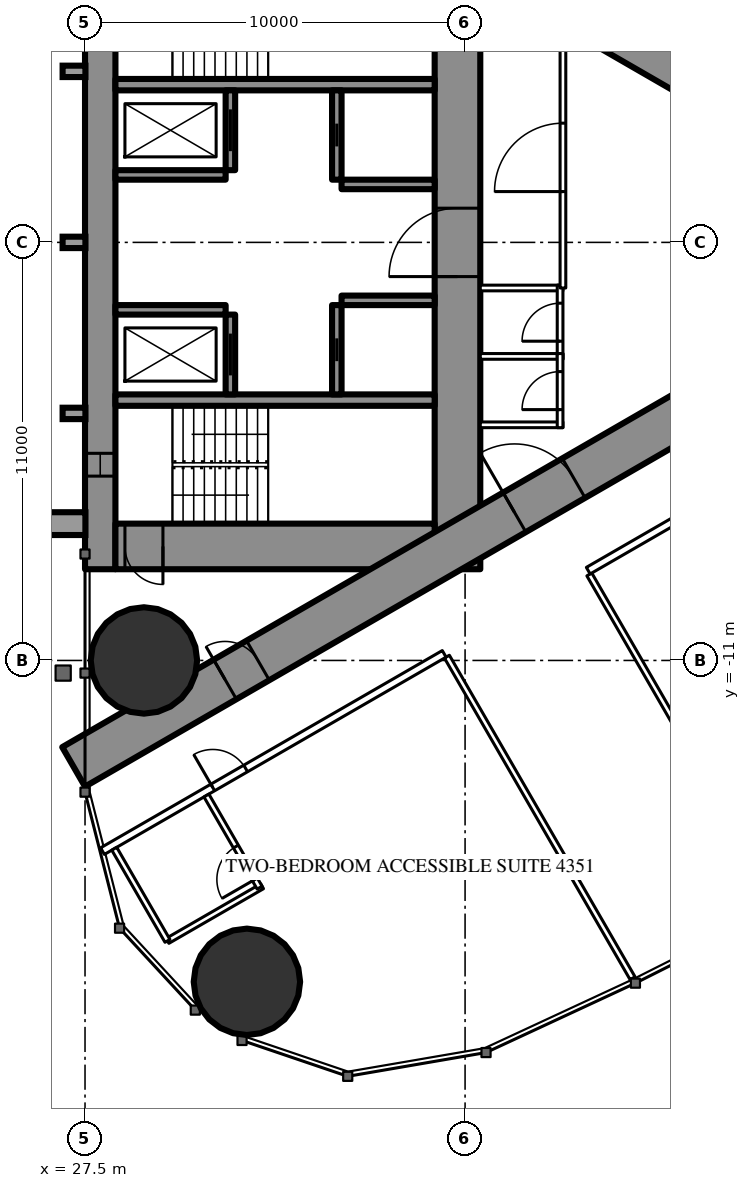
"""IFC4 building model, lengths in metres.
Left out: names, types, materials, properties, quantities, classifications, styles, units other than length and angle.
Written with IfcOpenShell. Run it as: python <this file> out.ifc"""

import sys

from ifc_helpers import new_model, si_unit, direction, frame, frame_2d, origin, origin_2d, place, context, subcontext, project, spatial, rectangle, circle, extrude, element, fill, save


model = new_model("IFC4")
c1 = context("Model", 3, precision=1e-05, world=origin(), true_north=direction((0.0, 1.0)))
c2 = subcontext(c1, "Body", "Model", "MODEL_VIEW")
j1 = project(units=[si_unit("LENGTHUNIT", "METRE"), si_unit("PLANEANGLEUNIT", "RADIAN")], contexts=[c1])
p1 = place(None, origin())
s1 = spatial("IfcSite", under=j1, at=p1, CompositionType="ELEMENT")
p2 = place(p1, origin())
s2 = spatial("IfcBuilding", under=s1, at=p2, CompositionType="ELEMENT")
p3 = place(p2, frame((0.0, 0.0, 163.3)))
s3 = spatial("IfcBuildingStorey", under=s2, at=p3, CompositionType="ELEMENT", Elevation=163.3)
for number, where, z_axis, x_axis in (
    (1, (31.76, -19.456, 0.0), (0.0, 0.0, 1.0), (1.0, 0.0, 0.0)),
    (2, (29.05, -11.0, 0.0), (0.0, 0.0, 1.0), (1.0, 0.0, 0.0)),
):
    element("IfcColumn", number, at=place(p3, frame(where, z_axis=z_axis, x_axis=x_axis)), inside=s3, PredefinedType="COLUMN", context=c2, shape_type="SweptSolid", body=[
        extrude(circle(Radius=1.4, at=origin_2d()), origin(), (0.0, 0.0, 1.0), 3.5),
    ])
p4 = place(p3, frame((27.9, -8.6, 0.0), z_axis=(0.0, 0.0, 1.0), x_axis=(0.0, 1.0, 0.0)))
e3 = element("IfcWall", 3, at=p4, inside=s3, PredefinedType="SHEAR", context=c2, shape_type="SweptSolid", body=[
    extrude(rectangle(XDim=17.2, YDim=0.8, at=frame_2d((8.6, 0.0))), origin(), (0.0, 0.0, 1.0), 3.5),
])
p5 = place(p4, frame((2.45, 0.0, 0.6)))
e4 = element("IfcOpeningElement", 4, at=p5, cuts=e3, PredefinedType="OPENING", context=c2, shape_type="SweptSolid", body=[
    extrude(rectangle(XDim=0.6, YDim=2.1, at=frame_2d((0.3, 1.05))), frame((0.0, 0.41, 0.0), z_axis=(0.0, -1.0, 0.0), x_axis=(1.0, 0.0, 0.0)), (0.0, 0.0, 1.0), 0.82),
])
p6 = place(p4, frame((14.15, 0.0, 0.6)))
e5 = element("IfcOpeningElement", 5, at=p6, cuts=e3, PredefinedType="OPENING", context=c2, shape_type="SweptSolid", body=[
    extrude(rectangle(XDim=0.6, YDim=2.1, at=frame_2d((0.3, 1.05))), frame((0.0, 0.41, 0.0), z_axis=(0.0, -1.0, 0.0), x_axis=(1.0, 0.0, 0.0)), (0.0, 0.0, 1.0), 0.82),
])
p7 = place(p3, frame((37.3, -8.6, 0.0), z_axis=(0.0, 0.0, 1.0), x_axis=(0.0, 1.0, 0.0)))
e6 = element("IfcWall", 6, at=p7, inside=s3, PredefinedType="SHEAR", context=c2, shape_type="SweptSolid", body=[
    extrude(rectangle(XDim=17.2, YDim=1.2, at=frame_2d((8.6, 0.0))), origin(), (0.0, 0.0, 1.0), 3.5),
])
p8 = place(p7, frame((7.7, 0.0, 0.0)))
e7 = element("IfcOpeningElement", 7, at=p8, cuts=e6, PredefinedType="OPENING", context=c2, shape_type="SweptSolid", body=[
    extrude(rectangle(XDim=1.8, YDim=2.2, at=frame_2d((0.9, 1.1))), frame((0.0, 0.61, 0.0), z_axis=(0.0, -1.0, 0.0), x_axis=(1.0, 0.0, 0.0)), (0.0, 0.0, 1.0), 1.22),
])
p9 = place(p3, frame((28.3, -8.0, 0.0), z_axis=(0.0, 0.0, 1.0), x_axis=(1.0, 0.0, 0.0)))
e8 = element("IfcWall", 8, at=p9, inside=s3, PredefinedType="SHEAR", context=c2, shape_type="SweptSolid", body=[
    extrude(rectangle(XDim=8.4, YDim=1.2, at=frame_2d((4.2, 0.0))), origin(), (0.0, 0.0, 1.0), 3.5),
])
p10 = place(p9, frame((0.25, 0.0, 0.0)))
e9 = element("IfcOpeningElement", 9, at=p10, cuts=e8, PredefinedType="OPENING", context=c2, shape_type="SweptSolid", body=[
    extrude(rectangle(XDim=1.0, YDim=2.2, at=frame_2d((0.5, 1.1))), frame((0.0, 0.61, 0.0), z_axis=(0.0, -1.0, 0.0), x_axis=(1.0, 0.0, 0.0)), (0.0, 0.0, 1.0), 1.22),
])
for number, where, z_axis, x_axis in (
    (10, (28.3, -4.15, 0.0), (0.0, 0.0, 1.0), (1.0, 0.0, 0.0)),
    (11, (28.3, 4.15, 0.0), (0.0, 0.0, 1.0), (1.0, 0.0, 0.0)),
):
    element("IfcWall", number, at=place(p3, frame(where, z_axis=z_axis, x_axis=x_axis)), inside=s3, PredefinedType="SHEAR", context=c2, shape_type="SweptSolid", body=[
        extrude(rectangle(XDim=8.4, YDim=0.3, at=frame_2d((4.2, 0.0))), origin(), (0.0, 0.0, 1.0), 3.5),
    ])
p11 = place(p3, frame((31.325, -4.0, 0.0), z_axis=(0.0, 0.0, 1.0), x_axis=(0.0, 1.0, 0.0)))
e12 = element("IfcWall", 12, at=p11, inside=s3, PredefinedType="SHEAR", context=c2, shape_type="SweptSolid", body=[
    extrude(rectangle(XDim=2.1, YDim=0.25, at=frame_2d((1.05, 0.0))), origin(), (0.0, 0.0, 1.0), 3.5),
])
p12 = place(p11, frame((0.5, 0.0, 0.0)))
e13 = element("IfcOpeningElement", 13, at=p12, cuts=e12, PredefinedType="OPENING", context=c2, shape_type="SweptSolid", body=[
    extrude(rectangle(XDim=1.1, YDim=2.2, at=frame_2d((0.55, 1.1))), frame((0.0, 0.135, 0.0), z_axis=(0.0, -1.0, 0.0), x_axis=(1.0, 0.0, 0.0)), (0.0, 0.0, 1.0), 0.27),
])
p13 = place(p3, frame((34.125, -4.0, 0.0), z_axis=(0.0, 0.0, 1.0), x_axis=(0.0, 1.0, 0.0)))
e14 = element("IfcWall", 14, at=p13, inside=s3, PredefinedType="SHEAR", context=c2, shape_type="SweptSolid", body=[
    extrude(rectangle(XDim=2.35, YDim=0.25, at=frame_2d((1.175, 0.0))), origin(), (0.0, 0.0, 1.0), 3.5),
])
p14 = place(p13, frame((0.875, 0.0, 0.0)))
e15 = element("IfcOpeningElement", 15, at=p14, cuts=e14, PredefinedType="OPENING", context=c2, shape_type="SweptSolid", body=[
    extrude(rectangle(XDim=0.6, YDim=2.0, at=frame_2d((0.3, 1.0))), frame((0.0, 0.135, 0.0), z_axis=(0.0, -1.0, 0.0), x_axis=(1.0, 0.0, 0.0)), (0.0, 0.0, 1.0), 0.27),
])
p15 = place(p3, frame((28.3, -1.775, 0.0), z_axis=(0.0, 0.0, 1.0), x_axis=(1.0, 0.0, 0.0)))
e16 = element("IfcWall", 16, at=p15, inside=s3, PredefinedType="SHEAR", context=c2, shape_type="SweptSolid", body=[
    extrude(rectangle(XDim=2.9, YDim=0.25, at=frame_2d((1.45, 0.0))), origin(), (0.0, 0.0, 1.0), 3.5),
])
p16 = place(p3, frame((34.25, -1.525, 0.0), z_axis=(0.0, 0.0, 1.0), x_axis=(1.0, 0.0, 0.0)))
e17 = element("IfcWall", 17, at=p16, inside=s3, PredefinedType="SHEAR", context=c2, shape_type="SweptSolid", body=[
    extrude(rectangle(XDim=2.45, YDim=0.25, at=frame_2d((1.225, 0.0))), origin(), (0.0, 0.0, 1.0), 3.5),
])
p17 = place(p3, frame((31.325, 1.9, 0.0), z_axis=(0.0, 0.0, 1.0), x_axis=(0.0, 1.0, 0.0)))
e18 = element("IfcWall", 18, at=p17, inside=s3, PredefinedType="SHEAR", context=c2, shape_type="SweptSolid", body=[
    extrude(rectangle(XDim=2.1, YDim=0.25, at=frame_2d((1.05, 0.0))), origin(), (0.0, 0.0, 1.0), 3.5),
])
p18 = place(p17, frame((0.5, 0.0, 0.0)))
e19 = element("IfcOpeningElement", 19, at=p18, cuts=e18, PredefinedType="OPENING", context=c2, shape_type="SweptSolid", body=[
    extrude(rectangle(XDim=1.1, YDim=2.2, at=frame_2d((0.55, 1.1))), frame((0.0, 0.135, 0.0), z_axis=(0.0, -1.0, 0.0), x_axis=(1.0, 0.0, 0.0)), (0.0, 0.0, 1.0), 0.27),
])
p19 = place(p3, frame((34.125, 1.65, 0.0), z_axis=(0.0, 0.0, 1.0), x_axis=(0.0, 1.0, 0.0)))
e20 = element("IfcWall", 20, at=p19, inside=s3, PredefinedType="SHEAR", context=c2, shape_type="SweptSolid", body=[
    extrude(rectangle(XDim=2.35, YDim=0.25, at=frame_2d((1.175, 0.0))), origin(), (0.0, 0.0, 1.0), 3.5),
])
p20 = place(p19, frame((0.875, 0.0, 0.0)))
e21 = element("IfcOpeningElement", 21, at=p20, cuts=e20, PredefinedType="OPENING", context=c2, shape_type="SweptSolid", body=[
    extrude(rectangle(XDim=0.6, YDim=2.0, at=frame_2d((0.3, 1.0))), frame((0.0, 0.135, 0.0), z_axis=(0.0, -1.0, 0.0), x_axis=(1.0, 0.0, 0.0)), (0.0, 0.0, 1.0), 0.27),
])
p21 = place(p3, frame((28.3, 1.775, 0.0), z_axis=(0.0, 0.0, 1.0), x_axis=(1.0, 0.0, 0.0)))
e22 = element("IfcWall", 22, at=p21, inside=s3, PredefinedType="SHEAR", context=c2, shape_type="SweptSolid", body=[
    extrude(rectangle(XDim=2.9, YDim=0.25, at=frame_2d((1.45, 0.0))), origin(), (0.0, 0.0, 1.0), 3.5),
])
p22 = place(p3, frame((34.25, 1.525, 0.0), z_axis=(0.0, 0.0, 1.0), x_axis=(1.0, 0.0, 0.0)))
e23 = element("IfcWall", 23, at=p22, inside=s3, PredefinedType="SHEAR", context=c2, shape_type="SweptSolid", body=[
    extrude(rectangle(XDim=2.45, YDim=0.25, at=frame_2d((1.225, 0.0))), origin(), (0.0, 0.0, 1.0), 3.5),
])
p23 = place(p3, frame((27.2, -13.8, 0.0), z_axis=(0.0, 0.0, 1.0), x_axis=(0.866027159892, 0.499996958321, 0.0)))
e24 = element("IfcWall", 24, at=p23, inside=s3, PredefinedType="SHEAR", context=c2, shape_type="SweptSolid", body=[
    extrude(rectangle(XDim=27.947, YDim=1.2, at=frame_2d((13.973, 0.0))), origin(), (0.0, 0.0, 1.0), 3.5),
])
p24 = place(p23, frame((4.6, 0.0, 0.0)))
e25 = element("IfcOpeningElement", 25, at=p24, cuts=e24, PredefinedType="OPENING", context=c2, shape_type="SweptSolid", body=[
    extrude(rectangle(XDim=1.0, YDim=2.2, at=frame_2d((0.5, 1.1))), frame((0.0, 0.61, 0.0), z_axis=(0.0, -1.0, 0.0), x_axis=(1.0, 0.0, 0.0)), (0.0, 0.0, 1.0), 1.22),
])
p25 = place(p23, frame((13.395, 0.0, 0.0)))
e26 = element("IfcOpeningElement", 26, at=p25, cuts=e24, PredefinedType="OPENING", context=c2, shape_type="SweptSolid", body=[
    extrude(rectangle(XDim=1.8, YDim=2.2, at=frame_2d((0.9, 1.1))), frame((0.0, 0.61, 0.0), z_axis=(0.0, -1.0, 0.0), x_axis=(1.0, 0.0, 0.0)), (0.0, 0.0, 1.0), 1.22),
])
p26 = place(p3, frame((27.2, 13.8, 0.0), z_axis=(0.0, 0.0, 1.0), x_axis=(0.866024515034, -0.500001539357, 0.0)))
e27 = element("IfcWall", 27, at=p26, inside=s3, PredefinedType="SHEAR", context=c2, shape_type="SweptSolid", body=[
    extrude(rectangle(XDim=26.907, YDim=1.2, at=frame_2d((13.454, 0.0))), origin(), (0.0, 0.0, 1.0), 3.5),
])
p27 = place(p26, frame((4.6, 0.0, 0.0)))
e28 = element("IfcOpeningElement", 28, at=p27, cuts=e27, PredefinedType="OPENING", context=c2, shape_type="SweptSolid", body=[
    extrude(rectangle(XDim=1.0, YDim=2.2, at=frame_2d((0.5, 1.1))), frame((0.0, 0.61, 0.0), z_axis=(0.0, -1.0, 0.0), x_axis=(1.0, 0.0, 0.0)), (0.0, 0.0, 1.0), 1.22),
])
p28 = place(p26, frame((13.395, 0.0, 0.0)))
e29 = element("IfcOpeningElement", 29, at=p28, cuts=e27, PredefinedType="OPENING", context=c2, shape_type="SweptSolid", body=[
    extrude(rectangle(XDim=1.8, YDim=2.2, at=frame_2d((0.9, 1.1))), frame((0.0, 0.61, 0.0), z_axis=(0.0, -1.0, 0.0), x_axis=(1.0, 0.0, 0.0)), (0.0, 0.0, 1.0), 1.22),
])
p29 = place(p3, frame((37.022, -10.9, 0.0), z_axis=(0.0, 0.0, 1.0), x_axis=(0.499998620953, -0.866026199976, 0.0)))
e30 = element("IfcWall", 30, at=p29, inside=s3, PredefinedType="PARTITIONING", context=c2, shape_type="SweptSolid", body=[
    extrude(rectangle(XDim=9.77, YDim=0.15, at=frame_2d((4.885, 0.0))), origin(), (0.0, 0.0, 1.0), 3.25),
])
p30 = place(p3, frame((40.769, -8.737, 0.0), z_axis=(0.0, 0.0, 1.0), x_axis=(0.500013115284, -0.866017831539, 0.0)))
e31 = element("IfcWall", 31, at=p30, inside=s3, PredefinedType="PARTITIONING", context=c2, shape_type="SweptSolid", body=[
    extrude(rectangle(XDim=7.198, YDim=0.15, at=frame_2d((3.599, 0.0))), origin(), (0.0, 0.0, 1.0), 2.3),
])
p31 = place(p3, frame((27.959, -16.017, 0.0), z_axis=(0.0, 0.0, 1.0), x_axis=(0.866026201739, 0.499998617899, 0.0)))
e32 = element("IfcWall", 32, at=p31, inside=s3, PredefinedType="PARTITIONING", context=c2, shape_type="SweptSolid", body=[
    extrude(rectangle(XDim=10.382, YDim=0.2, at=frame_2d((5.191, 0.0))), origin(), (0.0, 0.0, 1.0), 3.25),
])
p32 = place(p31, frame((3.35, 0.0, 0.0)))
e33 = element("IfcOpeningElement", 33, at=p32, cuts=e32, PredefinedType="OPENING", context=c2, shape_type="SweptSolid", body=[
    extrude(rectangle(XDim=1.0, YDim=2.2, at=frame_2d((0.5, 1.1))), frame((0.0, 0.11, 0.0), z_axis=(0.0, -1.0, 0.0), x_axis=(1.0, 0.0, 0.0)), (0.0, 0.0, 1.0), 0.22),
])
p33 = place(p3, frame((40.741, -8.638, 0.0), z_axis=(0.0, 0.0, 1.0), x_axis=(0.866022967338, 0.500004220025, 0.0)))
e34 = element("IfcWall", 34, at=p33, inside=s3, PredefinedType="PARTITIONING", context=c2, shape_type="SweptSolid", body=[
    extrude(rectangle(XDim=17.276, YDim=0.2, at=frame_2d((8.638, 0.0))), origin(), (0.0, 0.0, 1.0), 3.25),
])
p34 = place(p33, frame((7.316, 0.0, 0.0)))
e35 = element("IfcOpeningElement", 35, at=p34, cuts=e34, PredefinedType="OPENING", context=c2, shape_type="SweptSolid", body=[
    extrude(rectangle(XDim=0.95, YDim=2.2, at=frame_2d((0.475, 1.1))), frame((0.0, 0.11, 0.0), z_axis=(0.0, -1.0, 0.0), x_axis=(1.0, 0.0, 0.0)), (0.0, 0.0, 1.0), 0.22),
])
p35 = place(p33, frame((11.366, 0.0, 0.0)))
e36 = element("IfcOpeningElement", 36, at=p35, cuts=e34, PredefinedType="OPENING", context=c2, shape_type="SweptSolid", body=[
    extrude(rectangle(XDim=0.95, YDim=2.2, at=frame_2d((0.475, 1.1))), frame((0.0, 0.11, 0.0), z_axis=(0.0, -1.0, 0.0), x_axis=(1.0, 0.0, 0.0)), (0.0, 0.0, 1.0), 0.22),
])
p36 = place(p33, frame((13.347, 0.0, 0.0)))
e37 = element("IfcOpeningElement", 37, at=p36, cuts=e34, PredefinedType="OPENING", context=c2, shape_type="SweptSolid", body=[
    extrude(rectangle(XDim=0.95, YDim=2.2, at=frame_2d((0.475, 1.1))), frame((0.0, 0.11, 0.0), z_axis=(0.0, -1.0, 0.0), x_axis=(1.0, 0.0, 0.0)), (0.0, 0.0, 1.0), 0.22),
])
p37 = place(p3, frame((29.669, -18.379, 0.0), z_axis=(0.0, 0.0, 1.0), x_axis=(0.866039941686, 0.499974818771, 0.0)))
e38 = element("IfcWall", 38, at=p37, inside=s3, PredefinedType="PARTITIONING", context=c2, shape_type="SweptSolid", body=[
    extrude(rectangle(XDim=2.875, YDim=0.15, at=frame_2d((1.438, 0.0))), origin(), (0.0, 0.0, 1.0), 3.25),
])
p38 = place(p3, frame((30.694, -14.554, 0.0), z_axis=(0.0, 0.0, 1.0), x_axis=(0.500049511043, -0.865996816683, 0.0)))
e39 = element("IfcWall", 39, at=p38, inside=s3, PredefinedType="PARTITIONING", context=c2, shape_type="SweptSolid", body=[
    extrude(rectangle(XDim=2.8, YDim=0.15, at=frame_2d((1.4, 0.0))), origin(), (0.0, 0.0, 1.0), 2.3),
])
p39 = place(p38, frame((1.55, 0.0, 0.0)))
e40 = element("IfcOpeningElement", 40, at=p39, cuts=e39, PredefinedType="OPENING", context=c2, shape_type="SweptSolid", body=[
    extrude(rectangle(XDim=1.0, YDim=2.2, at=frame_2d((0.5, 1.1))), frame((0.0, 0.085, 0.0), z_axis=(0.0, -1.0, 0.0), x_axis=(1.0, 0.0, 0.0)), (0.0, 0.0, 1.0), 0.17),
])
p40 = place(p3, frame((28.269, -15.954, 0.0), z_axis=(0.0, 0.0, 1.0), x_axis=(0.49998411664, -0.866034573852, 0.0)))
e41 = element("IfcWall", 41, at=p40, inside=s3, PredefinedType="PARTITIONING", context=c2, shape_type="SweptSolid", body=[
    extrude(rectangle(XDim=2.8, YDim=0.15, at=frame_2d((1.4, 0.0))), origin(), (0.0, 0.0, 1.0), 3.25),
])
for number, where, z_axis, x_axis in (
    (42, (37.9, -1.2, 0.0), (0.0, 0.0, 1.0), (1.0, 0.0, 0.0)),
    (43, (37.9, -3.0, 0.0), (0.0, 0.0, 1.0), (1.0, 0.0, 0.0)),
    (44, (37.9, -4.8, 0.0), (0.0, 0.0, 1.0), (1.0, 0.0, 0.0)),
):
    element("IfcWall", number, at=place(p3, frame(where, z_axis=z_axis, x_axis=x_axis)), inside=s3, PredefinedType="PARTITIONING", context=c2, shape_type="SweptSolid", body=[
        extrude(rectangle(XDim=2.175, YDim=0.15, at=frame_2d((1.087, 0.0))), origin(), (0.0, 0.0, 1.0), 3.25),
    ])
p41 = place(p3, frame((40.0, -3.075, 0.0), z_axis=(0.0, 0.0, 1.0), x_axis=(0.0, 1.0, 0.0)))
e45 = element("IfcWall", 45, at=p41, inside=s3, PredefinedType="PARTITIONING", context=c2, shape_type="SweptSolid", body=[
    extrude(rectangle(XDim=1.95, YDim=0.15, at=frame_2d((0.975, 0.0))), origin(), (0.0, 0.0, 1.0), 3.25),
])
p42 = place(p41, frame((0.475, 0.0, 0.0)))
e46 = element("IfcOpeningElement", 46, at=p42, cuts=e45, PredefinedType="OPENING", context=c2, shape_type="SweptSolid", body=[
    extrude(rectangle(XDim=1.0, YDim=2.2, at=frame_2d((0.5, 1.1))), frame((0.0, 0.085, 0.0), z_axis=(0.0, -1.0, 0.0), x_axis=(1.0, 0.0, 0.0)), (0.0, 0.0, 1.0), 0.17),
])
p43 = place(p3, frame((40.0, -4.875, 0.0), z_axis=(0.0, 0.0, 1.0), x_axis=(0.0, 1.0, 0.0)))
e47 = element("IfcWall", 47, at=p43, inside=s3, PredefinedType="PARTITIONING", context=c2, shape_type="SweptSolid", body=[
    extrude(rectangle(XDim=1.95, YDim=0.15, at=frame_2d((0.975, 0.0))), origin(), (0.0, 0.0, 1.0), 3.25),
])
p44 = place(p43, frame((0.475, 0.0, 0.0)))
e48 = element("IfcOpeningElement", 48, at=p44, cuts=e47, PredefinedType="OPENING", context=c2, shape_type="SweptSolid", body=[
    extrude(rectangle(XDim=1.0, YDim=2.2, at=frame_2d((0.5, 1.1))), frame((0.0, 0.085, 0.0), z_axis=(0.0, -1.0, 0.0), x_axis=(1.0, 0.0, 0.0)), (0.0, 0.0, 1.0), 0.17),
])
p45 = place(p3, frame((40.075, -1.2, 0.0), z_axis=(0.0, 0.0, 1.0), x_axis=(0.0, 1.0, 0.0)))
e49 = element("IfcWall", 49, at=p45, inside=s3, PredefinedType="PARTITIONING", context=c2, shape_type="SweptSolid", body=[
    extrude(rectangle(XDim=6.874, YDim=0.15, at=frame_2d((3.437, 0.0))), origin(), (0.0, 0.0, 1.0), 3.25),
])
p46 = place(p45, frame((2.537, 0.0, 0.0)))
e50 = element("IfcOpeningElement", 50, at=p46, cuts=e49, PredefinedType="OPENING", context=c2, shape_type="SweptSolid", body=[
    extrude(rectangle(XDim=1.8, YDim=2.2, at=frame_2d((0.9, 1.1))), frame((0.0, 0.085, 0.0), z_axis=(0.0, -1.0, 0.0), x_axis=(1.0, 0.0, 0.0)), (0.0, 0.0, 1.0), 0.17),
])
p47 = place(p39, origin())
e51 = element("IfcDoor", 51, at=p47, inside=s3, OperationType="SINGLE_SWING_RIGHT", PredefinedType="DOOR", context=c2, shape_type="SweptSolid", body=[
    extrude(rectangle(XDim=1.0, YDim=2.2, at=frame_2d((0.5, 1.1))), frame((0.0, 0.025, 0.0), z_axis=(0.0, -1.0, 0.0), x_axis=(1.0, 0.0, 0.0)), (0.0, 0.0, 1.0), 0.05),
])
fill(e40, e51)
p48 = place(p32, origin())
e52 = element("IfcDoor", 52, at=p48, inside=s3, OperationType="SINGLE_SWING_LEFT", PredefinedType="DOOR", context=c2, shape_type="SweptSolid", body=[
    extrude(rectangle(XDim=1.0, YDim=2.2, at=frame_2d((0.5, 1.1))), frame((0.0, 0.025, 0.0), z_axis=(0.0, -1.0, 0.0), x_axis=(1.0, 0.0, 0.0)), (0.0, 0.0, 1.0), 0.05),
])
fill(e33, e52)
p49 = place(p42, origin())
e53 = element("IfcDoor", 53, at=p49, inside=s3, OperationType="SINGLE_SWING_LEFT", PredefinedType="DOOR", context=c2, shape_type="SweptSolid", body=[
    extrude(rectangle(XDim=1.0, YDim=2.2, at=frame_2d((0.5, 1.1))), frame((0.0, 0.025, 0.0), z_axis=(0.0, -1.0, 0.0), x_axis=(1.0, 0.0, 0.0)), (0.0, 0.0, 1.0), 0.05),
])
fill(e46, e53)
p50 = place(p44, origin())
e54 = element("IfcDoor", 54, at=p50, inside=s3, OperationType="SINGLE_SWING_LEFT", PredefinedType="DOOR", context=c2, shape_type="SweptSolid", body=[
    extrude(rectangle(XDim=1.0, YDim=2.2, at=frame_2d((0.5, 1.1))), frame((0.0, 0.025, 0.0), z_axis=(0.0, -1.0, 0.0), x_axis=(1.0, 0.0, 0.0)), (0.0, 0.0, 1.0), 0.05),
])
fill(e48, e54)
p51 = place(p46, origin())
e55 = element("IfcDoor", 55, at=p51, inside=s3, OperationType="DOUBLE_DOOR_SINGLE_SWING", PredefinedType="DOOR", context=c2, shape_type="SweptSolid", body=[
    extrude(rectangle(XDim=1.8, YDim=2.2, at=frame_2d((0.9, 1.1))), frame((0.0, 0.025, 0.0), z_axis=(0.0, -1.0, 0.0), x_axis=(1.0, 0.0, 0.0)), (0.0, 0.0, 1.0), 0.05),
])
fill(e50, e55)
p52 = place(p24, origin())
e56 = element("IfcDoor", 56, at=p52, inside=s3, OperationType="SINGLE_SWING_LEFT", PredefinedType="DOOR", context=c2, shape_type="SweptSolid", body=[
    extrude(rectangle(XDim=1.0, YDim=2.2, at=frame_2d((0.5, 1.1))), frame((0.0, 0.025, 0.0), z_axis=(0.0, -1.0, 0.0), x_axis=(1.0, 0.0, 0.0)), (0.0, 0.0, 1.0), 0.05),
])
fill(e25, e56)
p53 = place(p25, origin())
e57 = element("IfcDoor", 57, at=p53, inside=s3, OperationType="DOUBLE_DOOR_SINGLE_SWING", PredefinedType="DOOR", context=c2, shape_type="SweptSolid", body=[
    extrude(rectangle(XDim=1.8, YDim=2.2, at=frame_2d((0.9, 1.1))), frame((0.0, 0.025, 0.0), z_axis=(0.0, -1.0, 0.0), x_axis=(1.0, 0.0, 0.0)), (0.0, 0.0, 1.0), 0.05),
])
fill(e26, e57)
p54 = place(p8, origin())
e58 = element("IfcDoor", 58, at=p54, inside=s3, OperationType="DOUBLE_DOOR_SINGLE_SWING", PredefinedType="DOOR", context=c2, shape_type="SweptSolid", body=[
    extrude(rectangle(XDim=1.8, YDim=2.2, at=frame_2d((0.9, 1.1))), frame((0.0, 0.025, 0.0), z_axis=(0.0, -1.0, 0.0), x_axis=(1.0, 0.0, 0.0)), (0.0, 0.0, 1.0), 0.05),
])
fill(e7, e58)
p55 = place(p10, origin())
e59 = element("IfcDoor", 59, at=p55, inside=s3, OperationType="SINGLE_SWING_RIGHT", PredefinedType="DOOR", context=c2, shape_type="SweptSolid", body=[
    extrude(rectangle(XDim=1.0, YDim=2.2, at=frame_2d((0.5, 1.1))), frame((0.0, 0.025, 0.0), z_axis=(0.0, -1.0, 0.0), x_axis=(1.0, 0.0, 0.0)), (0.0, 0.0, 1.0), 0.05),
])
fill(e9, e59)
p56 = place(p12, origin())
e60 = element("IfcDoor", 60, at=p56, inside=s3, OperationType="SLIDING_TO_LEFT", PredefinedType="USERDEFINED", context=c2, shape_type="SweptSolid", body=[
    extrude(rectangle(XDim=1.1, YDim=2.2, at=frame_2d((0.55, 1.1))), frame((0.0, 0.025, 0.0), z_axis=(0.0, -1.0, 0.0), x_axis=(1.0, 0.0, 0.0)), (0.0, 0.0, 1.0), 0.05),
])
fill(e13, e60)
p57 = place(p18, origin())
e61 = element("IfcDoor", 61, at=p57, inside=s3, OperationType="SLIDING_TO_LEFT", PredefinedType="USERDEFINED", context=c2, shape_type="SweptSolid", body=[
    extrude(rectangle(XDim=1.1, YDim=2.2, at=frame_2d((0.55, 1.1))), frame((0.0, 0.025, 0.0), z_axis=(0.0, -1.0, 0.0), x_axis=(1.0, 0.0, 0.0)), (0.0, 0.0, 1.0), 0.05),
])
fill(e19, e61)
p58 = place(p14, origin())
e62 = element("IfcDoor", 62, at=p58, inside=s3, OperationType="SLIDING_TO_LEFT", PredefinedType="DOOR", context=c2, shape_type="SweptSolid", body=[
    extrude(rectangle(XDim=0.6, YDim=2.0, at=frame_2d((0.3, 1.0))), frame((0.0, 0.025, 0.0), z_axis=(0.0, -1.0, 0.0), x_axis=(1.0, 0.0, 0.0)), (0.0, 0.0, 1.0), 0.05),
])
fill(e15, e62)
p59 = place(p20, origin())
e63 = element("IfcDoor", 63, at=p59, inside=s3, OperationType="SLIDING_TO_LEFT", PredefinedType="DOOR", context=c2, shape_type="SweptSolid", body=[
    extrude(rectangle(XDim=0.6, YDim=2.0, at=frame_2d((0.3, 1.0))), frame((0.0, 0.025, 0.0), z_axis=(0.0, -1.0, 0.0), x_axis=(1.0, 0.0, 0.0)), (0.0, 0.0, 1.0), 0.05),
])
fill(e21, e63)
p60 = place(p5, origin())
e64 = element("IfcWindow", 64, at=p60, inside=s3, PartitioningType="SINGLE_PANEL", PredefinedType="WINDOW", context=c2, shape_type="SweptSolid", body=[
    extrude(rectangle(XDim=0.6, YDim=2.1, at=frame_2d((0.3, 1.05))), frame((0.0, 0.03, 0.0), z_axis=(0.0, -1.0, 0.0), x_axis=(1.0, 0.0, 0.0)), (0.0, 0.0, 1.0), 0.06),
])
fill(e4, e64)
save(model, sys.argv[1])
